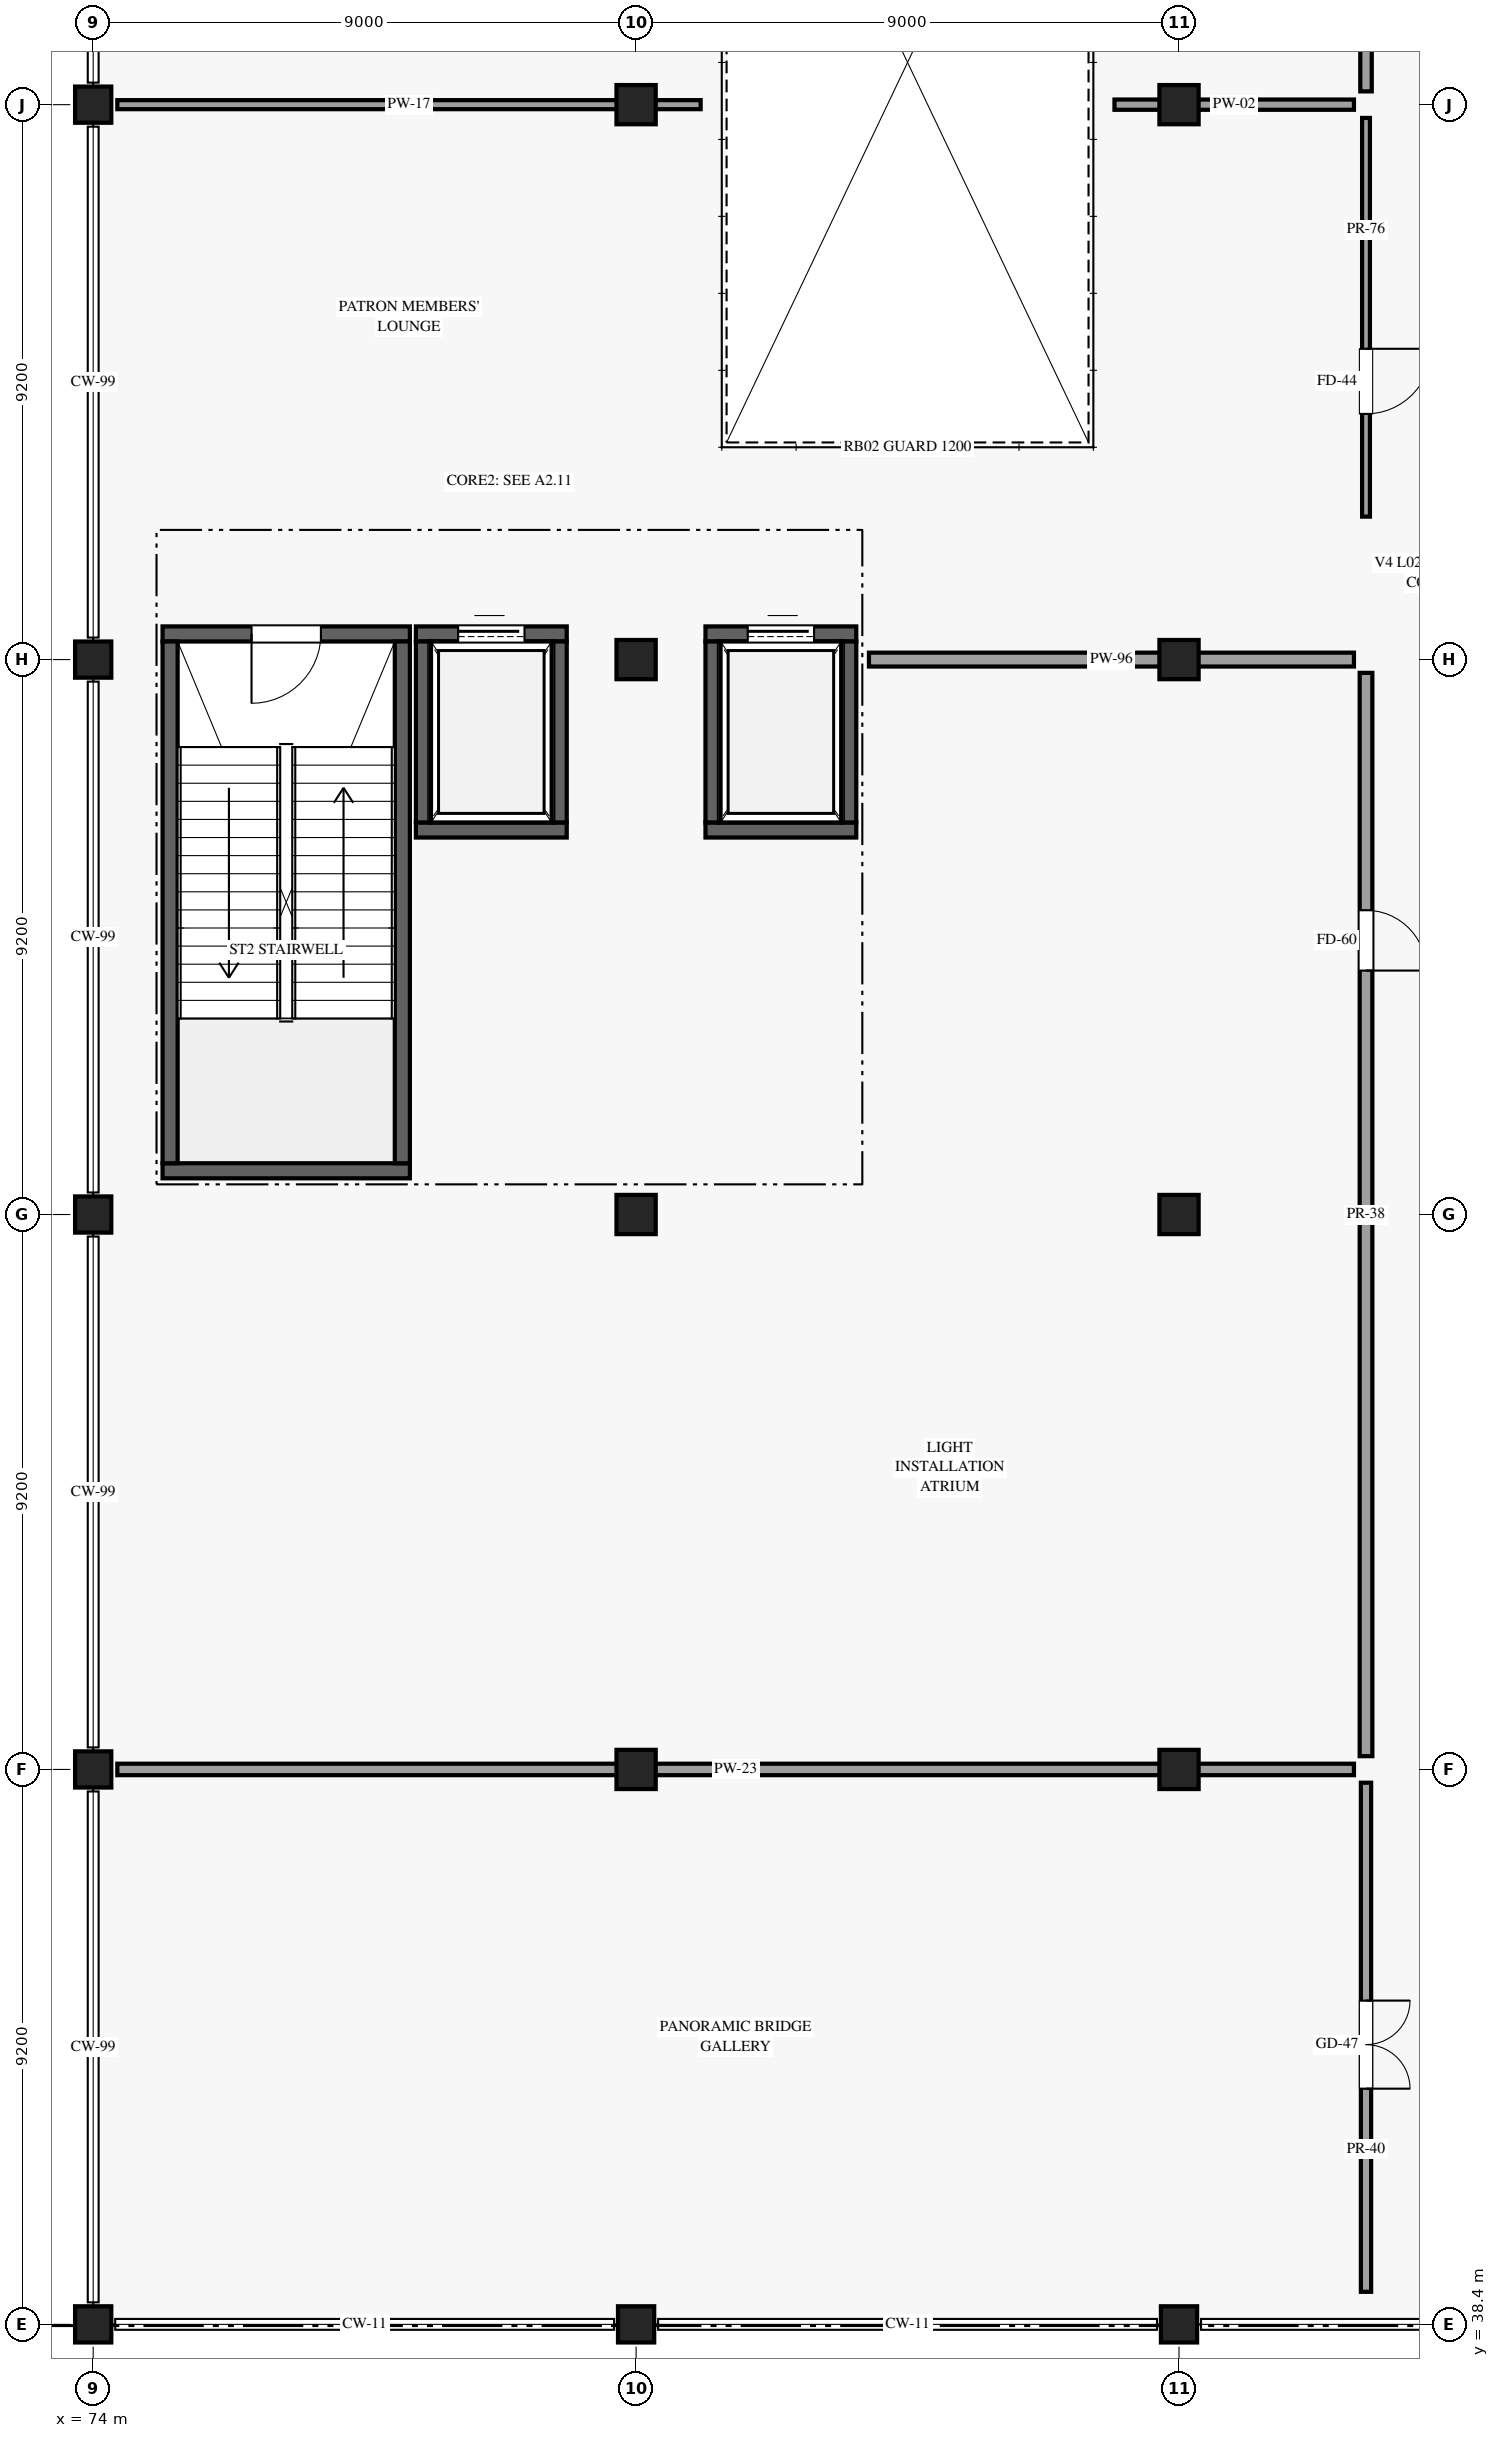
"""IFC4 building model, lengths in metres.
Left out: names, types, materials, properties, quantities, classifications, styles, units other than length and angle.
Written with IfcOpenShell. Run it as: python <this file> out.ifc"""

import sys

from ifc_helpers import new_model, si_unit, direction, frame, frame_2d, origin, origin_2d, place, context, subcontext, project, spatial, rectangle, circle, extrude, element, fill, save


model = new_model("IFC4")
c1 = context("Model", 3, precision=1e-05, world=origin(), true_north=direction((0.0, 1.0)))
c2 = subcontext(c1, "Body", "Model", "MODEL_VIEW")
j1 = project(units=[si_unit("LENGTHUNIT", "METRE"), si_unit("PLANEANGLEUNIT", "RADIAN")], contexts=[c1])
p1 = place(None, origin())
s1 = spatial("IfcSite", under=j1, at=p1, CompositionType="ELEMENT")
p2 = place(p1, origin())
s2 = spatial("IfcBuilding", under=s1, at=p2, CompositionType="ELEMENT")
p3 = place(p2, frame((0.0, 0.0, 10.2)))
s3 = spatial("IfcBuildingStorey", under=s2, at=p3, CompositionType="ELEMENT", Elevation=10.2)
for number, where, z_axis, x_axis in (
    (1, (74.0, 38.4, 0.0), (0.0, 0.0, 1.0), (1.0, 0.0, 0.0)),
    (2, (74.0, 47.6, 0.0), (0.0, 0.0, 1.0), (1.0, 0.0, 0.0)),
    (3, (74.0, 56.8, 0.0), (0.0, 0.0, 1.0), (1.0, 0.0, 0.0)),
    (4, (74.0, 66.0, 0.0), (0.0, 0.0, 1.0), (1.0, 0.0, 0.0)),
    (5, (74.0, 75.2, 0.0), (0.0, 0.0, 1.0), (1.0, 0.0, 0.0)),
    (6, (83.0, 38.4, 0.0), (0.0, 0.0, 1.0), (1.0, 0.0, 0.0)),
):
    element("IfcColumn", number, at=place(p3, frame(where, z_axis=z_axis, x_axis=x_axis)), inside=s3, PredefinedType="COLUMN", context=c2, shape_type="SweptSolid", body=[
        extrude(rectangle(XDim=0.6, YDim=0.6, at=origin_2d()), origin(), (0.0, 0.0, 1.0), 4.8),
    ])
for number, where, z_axis, x_axis in (
    (7, (83.0, 47.6, 0.0), (0.0, 0.0, 1.0), (1.0, 0.0, 0.0)),
    (8, (83.0, 56.8, 0.0), (0.0, 0.0, 1.0), (1.0, 0.0, 0.0)),
    (9, (83.0, 66.0, 0.0), (0.0, 0.0, 1.0), (1.0, 0.0, 0.0)),
    (10, (83.0, 75.2, 0.0), (0.0, 0.0, 1.0), (1.0, 0.0, 0.0)),
):
    element("IfcColumn", number, at=place(p3, frame(where, z_axis=z_axis, x_axis=x_axis)), inside=s3, PredefinedType="COLUMN", context=c2, shape_type="SweptSolid", body=[
        extrude(circle(Radius=0.325, at=origin_2d()), origin(), (0.0, 0.0, 1.0), 4.8),
    ])
p4 = place(p3, frame((92.0, 38.4, 0.0), z_axis=(0.0, 0.0, 1.0), x_axis=(1.0, 0.0, 0.0)))
e11 = element("IfcColumn", 11, at=p4, inside=s3, PredefinedType="COLUMN", context=c2, shape_type="SweptSolid", body=[
    extrude(rectangle(XDim=0.6, YDim=0.6, at=origin_2d()), origin(), (0.0, 0.0, 1.0), 4.8),
])
for number, where, z_axis, x_axis in (
    (12, (92.0, 47.6, 0.0), (0.0, 0.0, 1.0), (1.0, 0.0, 0.0)),
    (13, (92.0, 56.8, 0.0), (0.0, 0.0, 1.0), (1.0, 0.0, 0.0)),
    (14, (92.0, 66.0, 0.0), (0.0, 0.0, 1.0), (1.0, 0.0, 0.0)),
    (15, (92.0, 75.2, 0.0), (0.0, 0.0, 1.0), (1.0, 0.0, 0.0)),
):
    element("IfcColumn", number, at=place(p3, frame(where, z_axis=z_axis, x_axis=x_axis)), inside=s3, PredefinedType="COLUMN", context=c2, shape_type="SweptSolid", body=[
        extrude(circle(Radius=0.325, at=origin_2d()), origin(), (0.0, 0.0, 1.0), 4.8),
    ])
p5 = place(p3, frame((75.15, 66.425, 0.0), z_axis=(0.0, 0.0, 1.0), x_axis=(1.0, 0.0, 0.0)))
e16 = element("IfcWall", 16, at=p5, inside=s3, PredefinedType="SHEAR", context=c2, shape_type="SweptSolid", body=[
    extrude(rectangle(XDim=4.1, YDim=0.25, at=frame_2d((2.05, 0.0))), origin(), (0.0, 0.0, 1.0), 4.52),
])
p6 = place(p5, frame((2.625, 0.0, 0.0), z_axis=(0.0, 0.0, 1.0), x_axis=(-1.0, 0.0, 0.0)))
e17 = element("IfcOpeningElement", 17, at=p6, cuts=e16, PredefinedType="OPENING", context=c2, shape_type="SweptSolid", body=[
    extrude(rectangle(XDim=1.15, YDim=2.2, at=frame_2d((0.575, 1.1))), frame((0.0, 0.135, 0.0), z_axis=(0.0, -1.0, 0.0), x_axis=(1.0, 0.0, 0.0)), (0.0, 0.0, 1.0), 0.27),
])
p7 = place(p3, frame((75.15, 57.525, 0.0), z_axis=(0.0, 0.0, 1.0), x_axis=(1.0, 0.0, 0.0)))
e18 = element("IfcWall", 18, at=p7, inside=s3, PredefinedType="SHEAR", context=c2, shape_type="SweptSolid", body=[
    extrude(rectangle(XDim=4.1, YDim=0.25, at=frame_2d((2.05, 0.0))), origin(), (0.0, 0.0, 1.0), 4.52),
])
for number, where, z_axis, x_axis in (
    (19, (75.275, 57.65, 0.0), (0.0, 0.0, 1.0), (0.0, 1.0, 0.0)),
    (20, (79.125, 57.65, 0.0), (0.0, 0.0, 1.0), (0.0, 1.0, 0.0)),
):
    element("IfcWall", number, at=place(p3, frame(where, z_axis=z_axis, x_axis=x_axis)), inside=s3, PredefinedType="SHEAR", context=c2, shape_type="SweptSolid", body=[
        extrude(rectangle(XDim=8.65, YDim=0.25, at=frame_2d((4.325, 0.0))), origin(), (0.0, 0.0, 1.0), 4.52),
    ])
p8 = place(p3, frame((79.35, 66.425, 0.0), z_axis=(0.0, 0.0, 1.0), x_axis=(1.0, 0.0, 0.0)))
e21 = element("IfcWall", 21, at=p8, inside=s3, PredefinedType="SHEAR", context=c2, shape_type="SweptSolid", body=[
    extrude(rectangle(XDim=2.5, YDim=0.25, at=frame_2d((1.25, 0.0))), origin(), (0.0, 0.0, 1.0), 4.52),
])
p9 = place(p8, frame((0.7, 0.0, 0.0)))
e22 = element("IfcOpeningElement", 22, at=p9, cuts=e21, PredefinedType="OPENING", context=c2, shape_type="SweptSolid", body=[
    extrude(rectangle(XDim=1.1, YDim=2.2, at=frame_2d((0.55, 1.1))), frame((0.0, 0.135, 0.0), z_axis=(0.0, -1.0, 0.0), x_axis=(1.0, 0.0, 0.0)), (0.0, 0.0, 1.0), 0.27),
])
p10 = place(p3, frame((79.35, 63.175, 0.0), z_axis=(0.0, 0.0, 1.0), x_axis=(1.0, 0.0, 0.0)))
e23 = element("IfcWall", 23, at=p10, inside=s3, PredefinedType="SHEAR", context=c2, shape_type="SweptSolid", body=[
    extrude(rectangle(XDim=2.5, YDim=0.25, at=frame_2d((1.25, 0.0))), origin(), (0.0, 0.0, 1.0), 4.52),
])
for number, where, z_axis, x_axis in (
    (24, (81.725, 63.3, 0.0), (0.0, 0.0, 1.0), (0.0, 1.0, 0.0)),
    (25, (79.475, 63.3, 0.0), (0.0, 0.0, 1.0), (0.0, 1.0, 0.0)),
):
    element("IfcWall", number, at=place(p3, frame(where, z_axis=z_axis, x_axis=x_axis)), inside=s3, PredefinedType="SHEAR", context=c2, shape_type="SweptSolid", body=[
        extrude(rectangle(XDim=3.0, YDim=0.25, at=frame_2d((1.5, 0.0))), origin(), (0.0, 0.0, 1.0), 4.52),
    ])
p11 = place(p3, frame((84.15, 66.425, 0.0), z_axis=(0.0, 0.0, 1.0), x_axis=(1.0, 0.0, 0.0)))
e26 = element("IfcWall", 26, at=p11, inside=s3, PredefinedType="SHEAR", context=c2, shape_type="SweptSolid", body=[
    extrude(rectangle(XDim=2.5, YDim=0.25, at=frame_2d((1.25, 0.0))), origin(), (0.0, 0.0, 1.0), 4.52),
])
p12 = place(p11, frame((0.7, 0.0, 0.0)))
e27 = element("IfcOpeningElement", 27, at=p12, cuts=e26, PredefinedType="OPENING", context=c2, shape_type="SweptSolid", body=[
    extrude(rectangle(XDim=1.1, YDim=2.2, at=frame_2d((0.55, 1.1))), frame((0.0, 0.135, 0.0), z_axis=(0.0, -1.0, 0.0), x_axis=(1.0, 0.0, 0.0)), (0.0, 0.0, 1.0), 0.27),
])
p13 = place(p3, frame((84.15, 63.175, 0.0), z_axis=(0.0, 0.0, 1.0), x_axis=(1.0, 0.0, 0.0)))
e28 = element("IfcWall", 28, at=p13, inside=s3, PredefinedType="SHEAR", context=c2, shape_type="SweptSolid", body=[
    extrude(rectangle(XDim=2.5, YDim=0.25, at=frame_2d((1.25, 0.0))), origin(), (0.0, 0.0, 1.0), 4.52),
])
for number, where, z_axis, x_axis in (
    (29, (86.525, 63.3, 0.0), (0.0, 0.0, 1.0), (0.0, 1.0, 0.0)),
    (30, (84.275, 63.3, 0.0), (0.0, 0.0, 1.0), (0.0, 1.0, 0.0)),
):
    element("IfcWall", number, at=place(p3, frame(where, z_axis=z_axis, x_axis=x_axis)), inside=s3, PredefinedType="SHEAR", context=c2, shape_type="SweptSolid", body=[
        extrude(rectangle(XDim=3.0, YDim=0.25, at=frame_2d((1.5, 0.0))), origin(), (0.0, 0.0, 1.0), 4.52),
    ])
p14 = place(p3, frame((95.1, 38.94, 0.0), z_axis=(0.0, 0.0, 1.0), x_axis=(0.0, 1.0, 0.0)))
e31 = element("IfcWall", 31, at=p14, inside=s3, PredefinedType="PARTITIONING", context=c2, shape_type="SweptSolid", body=[
    extrude(rectangle(XDim=8.44, YDim=0.17, at=frame_2d((4.22, 0.0))), origin(), (0.0, 0.0, 1.0), 3.925),
])
p15 = place(p14, frame((4.828, 0.0, 0.0), z_axis=(0.0, 0.0, 1.0), x_axis=(-1.0, 0.0, 0.0)))
e32 = element("IfcOpeningElement", 32, at=p15, cuts=e31, PredefinedType="OPENING", context=c2, shape_type="SweptSolid", body=[
    extrude(rectangle(XDim=1.46, YDim=2.32, at=frame_2d((0.73, 1.16))), frame((0.0, 0.095, 0.0), z_axis=(0.0, -1.0, 0.0), x_axis=(1.0, 0.0, 0.0)), (0.0, 0.0, 1.0), 0.19),
])
p16 = place(p3, frame((74.4, 47.6, 0.0), z_axis=(0.0, 0.0, 1.0), x_axis=(1.0, 0.0, 0.0)))
e33 = element("IfcWall", 33, at=p16, inside=s3, PredefinedType="PARTITIONING", context=c2, shape_type="SweptSolid", body=[
    extrude(rectangle(XDim=20.5, YDim=0.19, at=frame_2d((10.25, 0.0))), origin(), (0.0, 0.0, 1.0), 3.925),
])
p17 = place(p3, frame((95.1, 47.82, 0.0), z_axis=(0.0, 0.0, 1.0), x_axis=(0.0, 1.0, 0.0)))
e34 = element("IfcWall", 34, at=p17, inside=s3, PredefinedType="PARTITIONING", context=c2, shape_type="SweptSolid", body=[
    extrude(rectangle(XDim=17.96, YDim=0.21, at=frame_2d((8.98, 0.0))), origin(), (0.0, 0.0, 1.0), 3.925),
])
p18 = place(p17, frame((14.024, 0.0, 0.0), z_axis=(0.0, 0.0, 1.0), x_axis=(-1.0, 0.0, 0.0)))
e35 = element("IfcOpeningElement", 35, at=p18, cuts=e34, PredefinedType="OPENING", context=c2, shape_type="SweptSolid", body=[
    extrude(rectangle(XDim=1.0, YDim=2.2, at=frame_2d((0.5, 1.1))), frame((0.0, 0.115, 0.0), z_axis=(0.0, -1.0, 0.0), x_axis=(1.0, 0.0, 0.0)), (0.0, 0.0, 1.0), 0.23),
])
p19 = place(p3, frame((86.86, 66.0, 0.0), z_axis=(0.0, 0.0, 1.0), x_axis=(1.0, 0.0, 0.0)))
e36 = element("IfcWall", 36, at=p19, inside=s3, PredefinedType="PARTITIONING", context=c2, shape_type="SweptSolid", body=[
    extrude(rectangle(XDim=8.04, YDim=0.23, at=frame_2d((4.02, 0.0))), origin(), (0.0, 0.0, 1.0), 3.925),
])
p20 = place(p3, frame((95.1, 68.37, 0.0), z_axis=(0.0, 0.0, 1.0), x_axis=(0.0, 1.0, 0.0)))
e37 = element("IfcWall", 37, at=p20, inside=s3, PredefinedType="PARTITIONING", context=c2, shape_type="SweptSolid", body=[
    extrude(rectangle(XDim=6.61, YDim=0.13, at=frame_2d((3.305, 0.0))), origin(), (0.0, 0.0, 1.0), 3.925),
])
p21 = place(p20, frame((2.783, 0.0, 0.0), z_axis=(0.0, 0.0, 1.0), x_axis=(-1.0, 0.0, 0.0)))
e38 = element("IfcOpeningElement", 38, at=p21, cuts=e37, PredefinedType="OPENING", context=c2, shape_type="SweptSolid", body=[
    extrude(rectangle(XDim=1.08, YDim=2.24, at=frame_2d((0.54, 1.12))), frame((0.0, 0.075, 0.0), z_axis=(0.0, -1.0, 0.0), x_axis=(1.0, 0.0, 0.0)), (0.0, 0.0, 1.0), 0.15),
])
p22 = place(p3, frame((74.4, 75.2, 0.0), z_axis=(0.0, 0.0, 1.0), x_axis=(1.0, 0.0, 0.0)))
e39 = element("IfcWall", 39, at=p22, inside=s3, PredefinedType="PARTITIONING", context=c2, shape_type="SweptSolid", body=[
    extrude(rectangle(XDim=9.67, YDim=0.15, at=frame_2d((4.835, 0.0))), origin(), (0.0, 0.0, 1.0), 3.925),
])
p23 = place(p3, frame((90.93, 75.2, 0.0), z_axis=(0.0, 0.0, 1.0), x_axis=(1.0, 0.0, 0.0)))
e40 = element("IfcWall", 40, at=p23, inside=s3, PredefinedType="PARTITIONING", context=c2, shape_type="SweptSolid", body=[
    extrude(rectangle(XDim=3.97, YDim=0.17, at=frame_2d((1.985, 0.0))), origin(), (0.0, 0.0, 1.0), 3.925),
])
p24 = place(p3, frame((95.1, 75.42, 0.0), z_axis=(0.0, 0.0, 1.0), x_axis=(0.0, 1.0, 0.0)))
e41 = element("IfcWall", 41, at=p24, inside=s3, PredefinedType="PARTITIONING", context=c2, shape_type="SweptSolid", body=[
    extrude(rectangle(XDim=17.64, YDim=0.19, at=frame_2d((8.82, 0.0))), origin(), (0.0, 0.0, 1.0), 3.925),
])
p25 = place(p24, frame((5.109, 0.0, 0.0), z_axis=(0.0, 0.0, 1.0), x_axis=(-1.0, 0.0, 0.0)))
e42 = element("IfcOpeningElement", 42, at=p25, cuts=e41, PredefinedType="OPENING", context=c2, shape_type="SweptSolid", body=[
    extrude(rectangle(XDim=1.2, YDim=2.3, at=frame_2d((0.6, 1.15))), frame((0.0, 0.105, 0.0), z_axis=(0.0, -1.0, 0.0), x_axis=(1.0, 0.0, 0.0)), (0.0, 0.0, 1.0), 0.21),
])
p26 = place(p6, origin())
e43 = element("IfcDoor", 43, at=p26, inside=s3, OperationType="SINGLE_SWING_RIGHT", PredefinedType="DOOR", context=c2, shape_type="SweptSolid", body=[
    extrude(rectangle(XDim=1.15, YDim=2.2, at=frame_2d((0.575, 1.1))), frame((0.0, 0.025, 0.0), z_axis=(0.0, -1.0, 0.0), x_axis=(1.0, 0.0, 0.0)), (0.0, 0.0, 1.0), 0.05),
])
fill(e17, e43)
p27 = place(p9, origin())
e44 = element("IfcDoor", 44, at=p27, inside=s3, OperationType="SLIDING_TO_LEFT", PredefinedType="DOOR", context=c2, shape_type="SweptSolid", body=[
    extrude(rectangle(XDim=1.1, YDim=2.2, at=frame_2d((0.55, 1.1))), frame((0.0, 0.025, 0.0), z_axis=(0.0, -1.0, 0.0), x_axis=(1.0, 0.0, 0.0)), (0.0, 0.0, 1.0), 0.05),
])
fill(e22, e44)
p28 = place(p12, origin())
e45 = element("IfcDoor", 45, at=p28, inside=s3, OperationType="SLIDING_TO_RIGHT", PredefinedType="DOOR", context=c2, shape_type="SweptSolid", body=[
    extrude(rectangle(XDim=1.1, YDim=2.2, at=frame_2d((0.55, 1.1))), frame((0.0, 0.025, 0.0), z_axis=(0.0, -1.0, 0.0), x_axis=(1.0, 0.0, 0.0)), (0.0, 0.0, 1.0), 0.05),
])
fill(e27, e45)
p29 = place(p15, origin())
e46 = element("IfcDoor", 46, at=p29, inside=s3, OperationType="DOUBLE_DOOR_SINGLE_SWING", PredefinedType="DOOR", context=c2, shape_type="SweptSolid", body=[
    extrude(rectangle(XDim=1.46, YDim=2.32, at=frame_2d((0.73, 1.16))), frame((0.0, 0.025, 0.0), z_axis=(0.0, -1.0, 0.0), x_axis=(1.0, 0.0, 0.0)), (0.0, 0.0, 1.0), 0.05),
])
fill(e32, e46)
p30 = place(p18, origin())
e47 = element("IfcDoor", 47, at=p30, inside=s3, OperationType="SINGLE_SWING_RIGHT", PredefinedType="DOOR", context=c2, shape_type="SweptSolid", body=[
    extrude(rectangle(XDim=1.0, YDim=2.2, at=frame_2d((0.5, 1.1))), frame((0.0, 0.025, 0.0), z_axis=(0.0, -1.0, 0.0), x_axis=(1.0, 0.0, 0.0)), (0.0, 0.0, 1.0), 0.05),
])
fill(e35, e47)
p31 = place(p21, origin())
e48 = element("IfcDoor", 48, at=p31, inside=s3, OperationType="SINGLE_SWING_LEFT", PredefinedType="DOOR", context=c2, shape_type="SweptSolid", body=[
    extrude(rectangle(XDim=1.08, YDim=2.24, at=frame_2d((0.54, 1.12))), frame((0.0, 0.025, 0.0), z_axis=(0.0, -1.0, 0.0), x_axis=(1.0, 0.0, 0.0)), (0.0, 0.0, 1.0), 0.05),
])
fill(e38, e48)
save(model, sys.argv[1])
